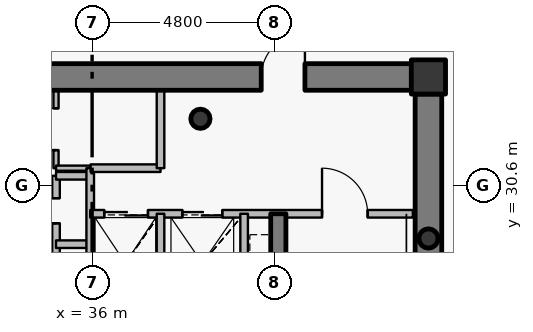
"""IFC4 building model, lengths in metres.
Left out: names, types, materials, properties, quantities, classifications, styles, units other than length and angle.
Written with IfcOpenShell. Run it as: python <this file> out.ifc"""

import sys

from ifc_helpers import new_model, si_unit, direction, frame, frame_2d, origin, origin_2d, place, context, subcontext, project, spatial, rectangle, hollow_circle, extrude, source, transform, mapped, element, fill, save


model = new_model("IFC4")
c1 = context("Model", 3, precision=1e-05, world=origin(), true_north=direction((0.0, 1.0)))
c2 = subcontext(c1, "Body", "Model", "MODEL_VIEW")
j1 = project(units=[si_unit("LENGTHUNIT", "METRE"), si_unit("PLANEANGLEUNIT", "RADIAN")], contexts=[c1])
p1 = place(None, origin())
s1 = spatial("IfcSite", under=j1, at=p1, CompositionType="ELEMENT")
p2 = place(p1, origin())
s2 = spatial("IfcBuilding", under=s1, at=p2, CompositionType="ELEMENT")
p3 = place(p2, frame((0.0, 0.0, 346.8)))
s3 = spatial("IfcBuildingStorey", under=s2, at=p3, CompositionType="ELEMENT", Elevation=346.8)
p4 = place(p3, frame((44.85, 33.45, 0.0), z_axis=(0.0, 0.0, 1.0), x_axis=(1.0, 0.0, 0.0)))
e1 = element("IfcColumn", 1, at=p4, inside=s3, PredefinedType="COLUMN", context=c2, shape_type="SweptSolid", body=[
    extrude(rectangle(XDim=0.9, YDim=0.9, at=origin_2d()), origin(), (0.0, 0.0, 1.0), 4.2),
])
p5 = place(p3, frame((38.85, 32.35, 0.0), z_axis=(0.0, 0.0, 1.0), x_axis=(1.0, 0.0, 0.0)))
e2 = element("IfcColumn", 2, at=p5, inside=s3, PredefinedType="COLUMN", context=c2, shape_type="SweptSolid", body=[
    extrude(hollow_circle(Radius=0.254, WallThickness=0.02, at=origin_2d()), origin(), (0.0, 0.0, 1.0), 4.2),
])
p6 = place(p3, frame((27.6, 33.45, 0.0), z_axis=(0.0, 0.0, 1.0), x_axis=(1.0, 0.0, 0.0)))
e3 = element("IfcWall", 3, at=p6, inside=s3, PredefinedType="SHEAR", context=c2, shape_type="SweptSolid", body=[
    extrude(rectangle(XDim=16.8, YDim=0.7, at=frame_2d((8.4, 0.0))), origin(), (0.0, 0.0, 1.0), 3.45),
])
p7 = place(p6, frame((12.85, 0.0, 0.0)))
e4 = element("IfcOpeningElement", 4, at=p7, cuts=e3, PredefinedType="OPENING", context=c2, shape_type="SweptSolid", body=[
    extrude(rectangle(XDim=1.15, YDim=2.15, at=origin_2d()), frame((0.575, 0.36, 1.075), z_axis=(0.0, -1.0, 0.0), x_axis=(1.0, 0.0, 0.0)), (0.0, 0.0, 1.0), 0.72),
])
p8 = place(p3, frame((44.85, 33.0, 0.0), z_axis=(0.0, 0.0, 1.0), x_axis=(0.0, -1.0, 0.0)))
e5 = element("IfcWall", 5, at=p8, inside=s3, PredefinedType="SHEAR", context=c2, shape_type="SweptSolid", body=[
    extrude(rectangle(XDim=12.0, YDim=0.7, at=frame_2d((6.0, 0.0))), origin(), (0.0, 0.0, 1.0), 3.45),
])
p9 = place(p3, frame((40.9, 27.25, 0.0), z_axis=(0.0, 0.0, 1.0), x_axis=(0.0, 1.0, 0.0)))
e6 = element("IfcWall", 6, at=p9, inside=s3, PredefinedType="SHEAR", context=c2, shape_type="SweptSolid", body=[
    extrude(rectangle(XDim=2.6, YDim=0.4, at=frame_2d((1.3, 0.0))), origin(), (0.0, 0.0, 1.0), 3.5),
])
p10 = place(p3, frame((44.85, 29.2, 0.0), z_axis=(0.0, 0.0, 1.0), x_axis=(1.0, 0.0, 0.0)))
e7 = element("IfcColumn", 7, at=p10, inside=s3, PredefinedType="COLUMN", context=c2, shape_type="SweptSolid", body=[
    extrude(hollow_circle(Radius=0.254, WallThickness=0.02, at=origin_2d()), origin(), (0.0, 0.0, 1.0), 4.2),
])
p11 = place(p3, frame((35.05, 27.25, 0.0), z_axis=(0.0, 0.0, 1.0), x_axis=(0.0, 1.0, 0.0)))
e8 = element("IfcWall", 8, at=p11, inside=s3, PredefinedType="PARTITIONING", context=c2, shape_type="SweptSolid", body=[
    extrude(rectangle(XDim=3.6, YDim=0.2, at=frame_2d((1.8, 0.0))), origin(), (0.0, 0.0, 1.0), 3.9),
])
p12 = place(p11, frame((0.59, 0.0, 0.0)))
e9 = element("IfcOpeningElement", 9, at=p12, cuts=e8, PredefinedType="OPENING", context=c2, shape_type="SweptSolid", body=[
    extrude(rectangle(XDim=0.66, YDim=2.05, at=origin_2d()), frame((0.33, 0.11, 1.025), z_axis=(0.0, -1.0, 0.0), x_axis=(1.0, 0.0, 0.0)), (0.0, 0.0, 1.0), 0.22),
])
p13 = place(p11, frame((2.35, 0.0, 0.0)))
e10 = element("IfcOpeningElement", 10, at=p13, cuts=e8, PredefinedType="OPENING", context=c2, shape_type="SweptSolid", body=[
    extrude(rectangle(XDim=0.66, YDim=2.05, at=origin_2d()), frame((0.33, 0.11, 1.025), z_axis=(0.0, -1.0, 0.0), x_axis=(1.0, 0.0, 0.0)), (0.0, 0.0, 1.0), 0.22),
])
for number, where, z_axis, x_axis in (
    (11, (35.05, 29.05, 0.0), (0.0, 0.0, 1.0), (1.0, 0.0, 0.0)),
    (12, (35.05, 30.85, 0.0), (0.0, 0.0, 1.0), (1.0, 0.0, 0.0)),
):
    element("IfcWall", number, at=place(p3, frame(where, z_axis=z_axis, x_axis=x_axis)), inside=s3, PredefinedType="PARTITIONING", context=c2, shape_type="SweptSolid", body=[
        extrude(rectangle(XDim=0.9, YDim=0.2, at=frame_2d((0.45, 0.0))), origin(), (0.0, 0.0, 1.0), 3.9),
    ])
p14 = place(p3, frame((35.05, 31.05, 0.0), z_axis=(0.0, 0.0, 1.0), x_axis=(0.0, 1.0, 0.0)))
e13 = element("IfcWall", 13, at=p14, inside=s3, PredefinedType="PARTITIONING", context=c2, shape_type="SweptSolid", body=[
    extrude(rectangle(XDim=2.05, YDim=0.135, at=frame_2d((1.025, 0.0))), origin(), (0.0, 0.0, 1.0), 3.485),
])
p15 = place(p14, frame((0.475, 0.0, 0.0)))
e14 = element("IfcOpeningElement", 14, at=p15, cuts=e13, PredefinedType="OPENING", context=c2, shape_type="SweptSolid", body=[
    extrude(rectangle(XDim=1.1, YDim=2.15, at=origin_2d()), frame((0.55, 0.078, 1.075), z_axis=(0.0, -1.0, 0.0), x_axis=(1.0, 0.0, 0.0)), (0.0, 0.0, 1.0), 0.155),
])
p16 = place(p3, frame((35.05, 31.05, 0.0), z_axis=(0.0, 0.0, 1.0), x_axis=(1.0, 0.0, 0.0)))
e15 = element("IfcWall", 15, at=p16, inside=s3, PredefinedType="PARTITIONING", context=c2, shape_type="SweptSolid", body=[
    extrude(rectangle(XDim=0.9, YDim=0.135, at=frame_2d((0.45, 0.0))), origin(), (0.0, 0.0, 1.0), 3.9),
])
p17 = place(p3, frame((35.95, 27.25, 0.0), z_axis=(0.0, 0.0, 1.0), x_axis=(0.0, 1.0, 0.0)))
e16 = element("IfcWall", 16, at=p17, inside=s3, PredefinedType="PARTITIONING", context=c2, shape_type="SweptSolid", body=[
    extrude(rectangle(XDim=3.8, YDim=0.2, at=frame_2d((1.9, 0.0))), origin(), (0.0, 0.0, 1.0), 3.9),
])
p18 = place(p3, frame((35.95, 29.85, 0.0), z_axis=(0.0, 0.0, 1.0), x_axis=(1.0, 0.0, 0.0)))
e17 = element("IfcWall", 17, at=p18, inside=s3, PredefinedType="PARTITIONING", context=c2, shape_type="SweptSolid", body=[
    extrude(rectangle(XDim=8.49, YDim=0.2, at=frame_2d((4.245, 0.0))), origin(), (0.0, 0.0, 1.0), 3.485),
])
p19 = place(p18, frame((6.1, 0.0, 0.0)))
e18 = element("IfcOpeningElement", 18, at=p19, cuts=e17, PredefinedType="OPENING", context=c2, shape_type="SweptSolid", body=[
    extrude(rectangle(XDim=1.2, YDim=2.15, at=origin_2d()), frame((0.6, 0.11, 1.075), z_axis=(0.0, -1.0, 0.0), x_axis=(1.0, 0.0, 0.0)), (0.0, 0.0, 1.0), 0.22),
])
p20 = place(p18, frame((0.37, 0.0, 0.0)))
e19 = element("IfcOpeningElement", 19, at=p20, cuts=e17, PredefinedType="OPENING", context=c2, shape_type="SweptSolid", body=[
    extrude(rectangle(XDim=1.15, YDim=2.15, at=origin_2d()), frame((0.575, 0.11, 1.075), z_axis=(0.0, -1.0, 0.0), x_axis=(1.0, 0.0, 0.0)), (0.0, 0.0, 1.0), 0.22),
])
p21 = place(p18, frame((2.425, 0.0, 0.0)))
e20 = element("IfcOpeningElement", 20, at=p21, cuts=e17, PredefinedType="OPENING", context=c2, shape_type="SweptSolid", body=[
    extrude(rectangle(XDim=1.05, YDim=2.15, at=origin_2d()), frame((0.525, 0.11, 1.075), z_axis=(0.0, -1.0, 0.0), x_axis=(1.0, 0.0, 0.0)), (0.0, 0.0, 1.0), 0.22),
])
p22 = place(p3, frame((35.96, 31.05, 0.0), z_axis=(0.0, 0.0, 1.0), x_axis=(1.0, 0.0, 0.0)))
e21 = element("IfcWall", 21, at=p22, inside=s3, PredefinedType="PARTITIONING", context=c2, shape_type="SweptSolid", body=[
    extrude(rectangle(XDim=1.84, YDim=0.2, at=frame_2d((0.92, 0.0))), origin(), (0.0, 0.0, 1.0), 3.9),
])
p23 = place(p3, frame((37.8, 27.25, 0.0), z_axis=(0.0, 0.0, 1.0), x_axis=(0.0, 1.0, 0.0)))
e22 = element("IfcWall", 22, at=p23, inside=s3, PredefinedType="PARTITIONING", context=c2, shape_type="SweptSolid", body=[
    extrude(rectangle(XDim=2.6, YDim=0.2, at=frame_2d((1.3, 0.0))), origin(), (0.0, 0.0, 1.0), 3.9),
])
p24 = place(p3, frame((37.8, 31.05, 0.0), z_axis=(0.0, 0.0, 1.0), x_axis=(0.0, 1.0, 0.0)))
e23 = element("IfcWall", 23, at=p24, inside=s3, PredefinedType="PARTITIONING", context=c2, shape_type="SweptSolid", body=[
    extrude(rectangle(XDim=2.05, YDim=0.2, at=frame_2d((1.025, 0.0))), origin(), (0.0, 0.0, 1.0), 3.485),
])
p25 = place(p3, frame((40.0, 25.45, 0.0), z_axis=(0.0, 0.0, 1.0), x_axis=(0.0, 1.0, 0.0)))
e24 = element("IfcWall", 24, at=p25, inside=s3, PredefinedType="PARTITIONING", context=c2, shape_type="SweptSolid", body=[
    extrude(rectangle(XDim=4.4, YDim=0.2, at=frame_2d((2.2, 0.0))), origin(), (0.0, 0.0, 1.0), 3.9),
])
p26 = place(p3, frame((45.2, 33.8, 0.0), z_axis=(0.0, 0.0, 1.0), x_axis=(-1.0, 0.0, 0.0)))
e25 = element("IfcWall", 25, at=p26, inside=s3, PredefinedType="PARTITIONING", context=c2, shape_type="SweptSolid", body=[
    extrude(rectangle(XDim=0.79, YDim=0.135, at=frame_2d((0.395, 0.0))), origin(), (0.0, 0.0, 1.0), 2.685),
])
p27 = place(p3, frame((45.2, 33.01, 0.0), z_axis=(0.0, 0.0, 1.0), x_axis=(0.0, 1.0, 0.0)))
e26 = element("IfcWall", 26, at=p27, inside=s3, PredefinedType="PARTITIONING", context=c2, shape_type="SweptSolid", body=[
    extrude(rectangle(XDim=0.482, YDim=0.135, at=frame_2d((0.241, 0.0))), origin(), (0.0, 0.0, 1.0), 3.9),
])
m1 = source(origin(), c2, "Body", "SweptSolid", [
    extrude(rectangle(XDim=1.15, YDim=2.15, at=origin_2d()), frame((0.575, 0.025, 1.075), z_axis=(0.0, -1.0, 0.0), x_axis=(1.0, 0.0, 0.0)), (0.0, 0.0, 1.0), 0.05),
])
p28 = place(p7, origin())
e27 = element("IfcDoor", 27, at=p28, inside=s3, OperationType="SINGLE_SWING_RIGHT", PredefinedType="DOOR", context=c2, shape_type="MappedRepresentation", body=[
    mapped(m1, transform((0.0, 0.0, 0.0), x_axis=(1.0, 0.0, 0.0), y_axis=(0.0, 1.0, 0.0), z_axis=(0.0, 0.0, 1.0), scale=1.0)),
])
fill(e4, e27)
m2 = source(origin(), c2, "Body", "SweptSolid", [
    extrude(rectangle(XDim=1.2, YDim=2.15, at=origin_2d()), frame((0.6, 0.025, 1.075), z_axis=(0.0, -1.0, 0.0), x_axis=(1.0, 0.0, 0.0)), (0.0, 0.0, 1.0), 0.05),
])
p29 = place(p19, origin())
e28 = element("IfcDoor", 28, at=p29, inside=s3, OperationType="SINGLE_SWING_LEFT", PredefinedType="DOOR", context=c2, shape_type="MappedRepresentation", body=[
    mapped(m2, transform((0.0, 0.0, 0.0), x_axis=(1.0, 0.0, 0.0), y_axis=(0.0, 1.0, 0.0), z_axis=(0.0, 0.0, 1.0), scale=1.0)),
])
fill(e18, e28)
m3 = source(origin(), c2, "Body", "SweptSolid", [
    extrude(rectangle(XDim=1.15, YDim=2.15, at=origin_2d()), frame((0.575, 0.025, 1.075), z_axis=(0.0, -1.0, 0.0), x_axis=(1.0, 0.0, 0.0)), (0.0, 0.0, 1.0), 0.05),
])
p30 = place(p20, origin())
e29 = element("IfcDoor", 29, at=p30, inside=s3, OperationType="DOUBLE_DOOR_SLIDING", PredefinedType="USERDEFINED", context=c2, shape_type="MappedRepresentation", body=[
    mapped(m3, transform((0.0, 0.0, 0.0), x_axis=(1.0, 0.0, 0.0), y_axis=(0.0, 1.0, 0.0), z_axis=(0.0, 0.0, 1.0), scale=1.0)),
])
fill(e19, e29)
m4 = source(origin(), c2, "Body", "SweptSolid", [
    extrude(rectangle(XDim=1.05, YDim=2.15, at=origin_2d()), frame((0.525, 0.025, 1.075), z_axis=(0.0, -1.0, 0.0), x_axis=(1.0, 0.0, 0.0)), (0.0, 0.0, 1.0), 0.05),
])
p31 = place(p21, origin())
e30 = element("IfcDoor", 30, at=p31, inside=s3, OperationType="DOUBLE_DOOR_SLIDING", PredefinedType="USERDEFINED", context=c2, shape_type="MappedRepresentation", body=[
    mapped(m4, transform((0.0, 0.0, 0.0), x_axis=(1.0, 0.0, 0.0), y_axis=(0.0, 1.0, 0.0), z_axis=(0.0, 0.0, 1.0), scale=1.0)),
])
fill(e20, e30)
m5 = source(origin(), c2, "Body", "SweptSolid", [
    extrude(rectangle(XDim=0.66, YDim=2.05, at=origin_2d()), frame((0.33, 0.025, 1.025), z_axis=(0.0, -1.0, 0.0), x_axis=(1.0, 0.0, 0.0)), (0.0, 0.0, 1.0), 0.05),
])
p32 = place(p13, origin())
e31 = element("IfcDoor", 31, at=p32, inside=s3, OperationType="SINGLE_SWING_LEFT", PredefinedType="USERDEFINED", context=c2, shape_type="MappedRepresentation", body=[
    mapped(m5, transform((0.0, 0.0, 0.0), x_axis=(1.0, 0.0, 0.0), y_axis=(0.0, 1.0, 0.0), z_axis=(0.0, 0.0, 1.0), scale=1.0)),
])
fill(e10, e31)
m6 = source(origin(), c2, "Body", "SweptSolid", [
    extrude(rectangle(XDim=1.1, YDim=2.15, at=origin_2d()), frame((0.55, 0.025, 1.075), z_axis=(0.0, -1.0, 0.0), x_axis=(1.0, 0.0, 0.0)), (0.0, 0.0, 1.0), 0.05),
])
p33 = place(p15, origin())
e32 = element("IfcDoor", 32, at=p33, inside=s3, OperationType="SINGLE_SWING_LEFT", PredefinedType="DOOR", context=c2, shape_type="MappedRepresentation", body=[
    mapped(m6, transform((0.0, 0.0, 0.0), x_axis=(1.0, 0.0, 0.0), y_axis=(0.0, 1.0, 0.0), z_axis=(0.0, 0.0, 1.0), scale=1.0)),
])
fill(e14, e32)
save(model, sys.argv[1])
